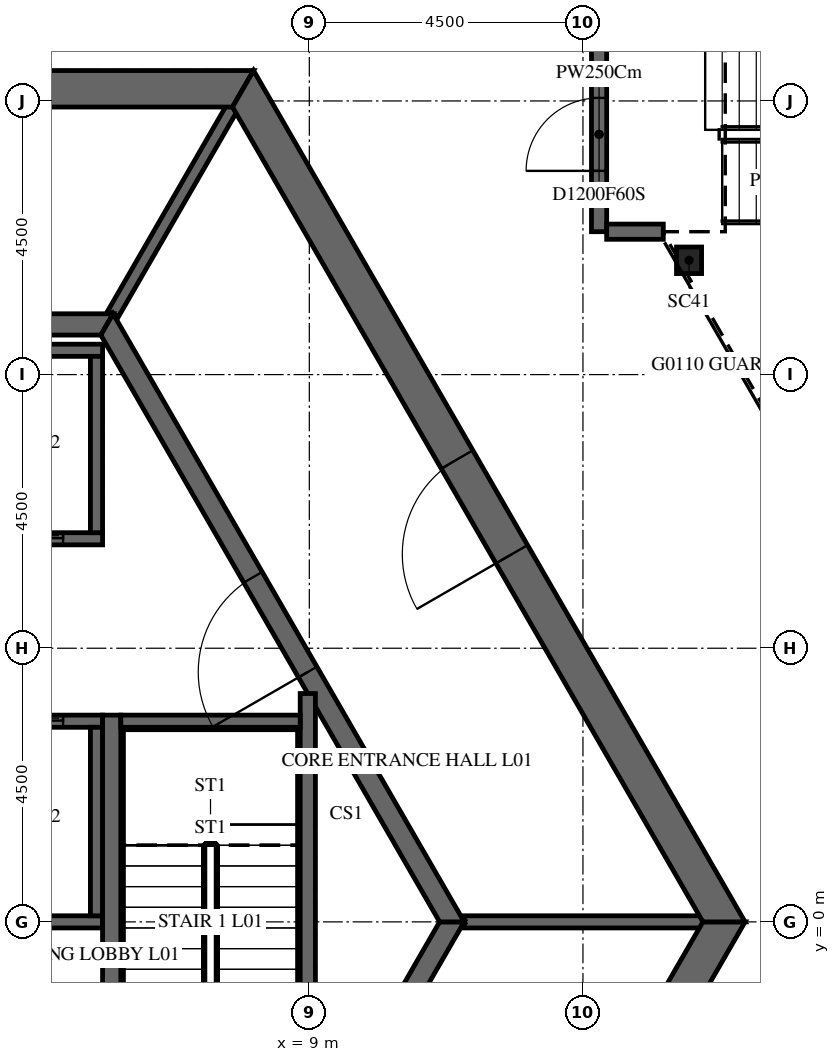
"""IFC4 building model, lengths in metres.
Left out: names, types, materials, properties, quantities, classifications, styles, units other than length and angle.
Written with IfcOpenShell. Run it as: python <this file> out.ifc"""

import sys

from ifc_helpers import new_model, si_unit, direction, frame, frame_2d, origin, origin_2d, place, context, subcontext, project, spatial, polyline, rectangle, i_section, outline, extrude, element, fill, save


model = new_model("IFC4")
c1 = context("Model", 3, precision=1e-05, world=origin(), true_north=direction((0.0, 1.0)))
c2 = subcontext(c1, "Body", "Model", "MODEL_VIEW")
j1 = project(units=[si_unit("LENGTHUNIT", "METRE"), si_unit("PLANEANGLEUNIT", "RADIAN")], contexts=[c1])
p1 = place(None, origin())
s1 = spatial("IfcSite", under=j1, at=p1, CompositionType="ELEMENT")
p2 = place(p1, origin())
s2 = spatial("IfcBuilding", under=s1, at=p2, CompositionType="ELEMENT")
p3 = place(p2, frame((0.0, 0.0, 9.0)))
s3 = spatial("IfcBuildingStorey", under=s2, at=p3, CompositionType="ELEMENT", Elevation=9.0)
p4 = place(p3, frame((15.245, 10.88, -0.25), z_axis=(0.0, 0.0, 1.0), x_axis=(1.0, 0.0, 0.0)))
e1 = element("IfcColumn", 1, at=p4, inside=s3, PredefinedType="COLUMN", context=c2, shape_type="SweptSolid", body=[
    extrude(i_section(OverallWidth=0.412, OverallDepth=0.437, WebThickness=0.036, FlangeThickness=0.058, FilletRadius=0.015, at=origin_2d()), origin(), (0.0, 0.0, 1.0), 6.0),
])
p5 = place(p3, frame((7.91, -13.7, -0.25), z_axis=(0.0, 0.0, 1.0), x_axis=(0.499999880136, 0.866025472988, 0.0)))
e2 = element("IfcWall", 2, at=p5, inside=s3, PredefinedType="SHEAR", context=c2, shape_type="SweptSolid", body=[
    extrude(outline(polyline([(-0.173, -0.3), (15.993, -0.3), (15.646, 0.3), (0.173, 0.3), (-0.173, -0.3)])), origin(), (0.0, 0.0, 1.0), 6.0),
])
p6 = place(p5, frame((7.039, 0.0, 0.25)))
e3 = element("IfcOpeningElement", 3, at=p6, cuts=e2, PredefinedType="OPENING", context=c2, shape_type="SweptSolid", body=[
    extrude(rectangle(XDim=1.8, YDim=2.4, at=frame_2d((0.9, 1.2))), frame((0.0, 0.31, 0.0), z_axis=(0.0, -1.0, 0.0), x_axis=(1.0, 0.0, 0.0)), (0.0, 0.0, 1.0), 0.62),
])
p7 = place(p3, frame((15.819, 0.0, -0.25), z_axis=(0.0, 0.0, 1.0), x_axis=(-0.499999880136, 0.866025472988, 0.0)))
e4 = element("IfcWall", 4, at=p7, inside=s3, PredefinedType="SHEAR", context=c2, shape_type="SweptSolid", body=[
    extrude(outline(polyline([(-0.173, -0.3), (15.993, -0.3), (15.646, 0.3), (0.173, 0.3), (-0.173, -0.3)])), origin(), (0.0, 0.0, 1.0), 6.0),
])
p8 = place(p7, frame((6.981, 0.0, 0.25)))
e5 = element("IfcOpeningElement", 5, at=p8, cuts=e4, PredefinedType="OPENING", context=c2, shape_type="SweptSolid", body=[
    extrude(rectangle(XDim=1.8, YDim=2.4, at=frame_2d((0.9, 1.2))), frame((0.0, 0.31, 0.0), z_axis=(0.0, -1.0, 0.0), x_axis=(1.0, 0.0, 0.0)), (0.0, 0.0, 1.0), 0.62),
])
p9 = place(p3, frame((7.91, 13.7, -0.25), z_axis=(0.0, 0.0, 1.0), x_axis=(-1.0, 0.0, 0.0)))
e6 = element("IfcWall", 6, at=p9, inside=s3, PredefinedType="SHEAR", context=c2, shape_type="SweptSolid", body=[
    extrude(outline(polyline([(-0.173, -0.3), (15.993, -0.3), (15.646, 0.3), (0.173, 0.3), (-0.173, -0.3)])), origin(), (0.0, 0.0, 1.0), 6.0),
])
p10 = place(p9, frame((7.31, 0.0, 0.25)))
e7 = element("IfcOpeningElement", 7, at=p10, cuts=e6, PredefinedType="OPENING", context=c2, shape_type="SweptSolid", body=[
    extrude(rectangle(XDim=1.2, YDim=2.4, at=frame_2d((0.6, 1.2))), frame((0.0, 0.31, 0.0), z_axis=(0.0, -1.0, 0.0), x_axis=(1.0, 0.0, 0.0)), (0.0, 0.0, 1.0), 0.62),
])
p11 = place(p3, frame((5.673, -9.825, -0.25), z_axis=(0.0, 0.0, 1.0), x_axis=(0.499995046907, 0.866028263435, 0.0)))
e8 = element("IfcWall", 8, at=p11, inside=s3, PredefinedType="SHEAR", context=c2, shape_type="SweptSolid", body=[
    extrude(outline(polyline([(-0.101, -0.175), (11.446, -0.175), (11.244, 0.175), (0.101, 0.175), (-0.101, -0.175)])), origin(), (0.0, 0.0, 1.0), 6.0),
])
p12 = place(p11, frame((4.801, 0.0, 0.25)))
e9 = element("IfcOpeningElement", 9, at=p12, cuts=e8, PredefinedType="OPENING", context=c2, shape_type="SweptSolid", body=[
    extrude(rectangle(XDim=1.8, YDim=2.4, at=frame_2d((0.9, 1.2))), frame((0.0, 0.185, 0.0), z_axis=(0.0, -1.0, 0.0), x_axis=(1.0, 0.0, 0.0)), (0.0, 0.0, 1.0), 0.37),
])
p13 = place(p3, frame((11.345, 0.0, -0.25), z_axis=(0.0, 0.0, 1.0), x_axis=(-0.499995046907, 0.866028263435, 0.0)))
e10 = element("IfcWall", 10, at=p13, inside=s3, PredefinedType="SHEAR", context=c2, shape_type="SweptSolid", body=[
    extrude(outline(polyline([(-0.101, -0.175), (11.446, -0.175), (11.244, 0.175), (0.101, 0.175), (-0.101, -0.175)])), origin(), (0.0, 0.0, 1.0), 6.0),
])
p14 = place(p13, frame((4.744, 0.0, 0.25)))
e11 = element("IfcOpeningElement", 11, at=p14, cuts=e10, PredefinedType="OPENING", context=c2, shape_type="SweptSolid", body=[
    extrude(rectangle(XDim=1.8, YDim=2.4, at=frame_2d((0.9, 1.2))), frame((0.0, 0.185, 0.0), z_axis=(0.0, -1.0, 0.0), x_axis=(1.0, 0.0, 0.0)), (0.0, 0.0, 1.0), 0.37),
])
p15 = place(p3, frame((5.673, 9.825, -0.25), z_axis=(0.0, 0.0, 1.0), x_axis=(-1.0, 0.0, 0.0)))
e12 = element("IfcWall", 12, at=p15, inside=s3, PredefinedType="SHEAR", context=c2, shape_type="SweptSolid", body=[
    extrude(outline(polyline([(-0.101, -0.175), (11.446, -0.175), (11.244, 0.175), (0.101, 0.175), (-0.101, -0.175)])), origin(), (0.0, 0.0, 1.0), 6.0),
])
p16 = place(p3, frame((-5.6, 6.3, -0.25), z_axis=(0.0, 0.0, 1.0), x_axis=(1.0, 0.0, 0.0)))
e13 = element("IfcWall", 13, at=p16, inside=s3, PredefinedType="SHEAR", context=c2, shape_type="SweptSolid", body=[
    extrude(rectangle(XDim=11.2, YDim=0.2, at=frame_2d((5.6, 0.0))), origin(), (0.0, 0.0, 1.0), 6.0),
])
p17 = place(p16, frame((0.65, 0.0, 0.25)))
e14 = element("IfcOpeningElement", 14, at=p17, cuts=e13, PredefinedType="OPENING", context=c2, shape_type="SweptSolid", body=[
    extrude(rectangle(XDim=1.1, YDim=2.1, at=frame_2d((0.55, 1.05))), frame((0.0, 0.11, 0.0), z_axis=(0.0, -1.0, 0.0), x_axis=(1.0, 0.0, 0.0)), (0.0, 0.0, 1.0), 0.22),
])
p18 = place(p16, frame((2.85, 0.0, 0.25)))
e15 = element("IfcOpeningElement", 15, at=p18, cuts=e13, PredefinedType="OPENING", context=c2, shape_type="SweptSolid", body=[
    extrude(rectangle(XDim=1.1, YDim=2.1, at=frame_2d((0.55, 1.05))), frame((0.0, 0.11, 0.0), z_axis=(0.0, -1.0, 0.0), x_axis=(1.0, 0.0, 0.0)), (0.0, 0.0, 1.0), 0.22),
])
p19 = place(p16, frame((5.05, 0.0, 0.25)))
e16 = element("IfcOpeningElement", 16, at=p19, cuts=e13, PredefinedType="OPENING", context=c2, shape_type="SweptSolid", body=[
    extrude(rectangle(XDim=1.1, YDim=2.1, at=frame_2d((0.55, 1.05))), frame((0.0, 0.11, 0.0), z_axis=(0.0, -1.0, 0.0), x_axis=(1.0, 0.0, 0.0)), (0.0, 0.0, 1.0), 0.22),
])
p20 = place(p16, frame((7.25, 0.0, 0.25)))
e17 = element("IfcOpeningElement", 17, at=p20, cuts=e13, PredefinedType="OPENING", context=c2, shape_type="SweptSolid", body=[
    extrude(rectangle(XDim=1.1, YDim=2.1, at=frame_2d((0.55, 1.05))), frame((0.0, 0.11, 0.0), z_axis=(0.0, -1.0, 0.0), x_axis=(1.0, 0.0, 0.0)), (0.0, 0.0, 1.0), 0.22),
])
p21 = place(p16, frame((9.45, 0.0, 0.25)))
e18 = element("IfcOpeningElement", 18, at=p21, cuts=e13, PredefinedType="OPENING", context=c2, shape_type="SweptSolid", body=[
    extrude(rectangle(XDim=1.1, YDim=2.1, at=frame_2d((0.55, 1.05))), frame((0.0, 0.11, 0.0), z_axis=(0.0, -1.0, 0.0), x_axis=(1.0, 0.0, 0.0)), (0.0, 0.0, 1.0), 0.22),
])
p22 = place(p3, frame((-5.6, 9.4, -0.25), z_axis=(0.0, 0.0, 1.0), x_axis=(1.0, 0.0, 0.0)))
e19 = element("IfcWall", 19, at=p22, inside=s3, PredefinedType="SHEAR", context=c2, shape_type="SweptSolid", body=[
    extrude(rectangle(XDim=11.2, YDim=0.2, at=frame_2d((5.6, 0.0))), origin(), (0.0, 0.0, 1.0), 6.0),
])
p23 = place(p3, frame((5.5, 6.4, -0.25), z_axis=(0.0, 0.0, 1.0), x_axis=(0.0, 1.0, 0.0)))
e20 = element("IfcWall", 20, at=p23, inside=s3, PredefinedType="SHEAR", context=c2, shape_type="SweptSolid", body=[
    extrude(rectangle(XDim=2.9, YDim=0.2, at=frame_2d((1.45, 0.0))), origin(), (0.0, 0.0, 1.0), 6.0),
])
p24 = place(p3, frame((-5.6, 3.3, -0.25), z_axis=(0.0, 0.0, 1.0), x_axis=(1.0, 0.0, 0.0)))
e21 = element("IfcWall", 21, at=p24, inside=s3, PredefinedType="SHEAR", context=c2, shape_type="SweptSolid", body=[
    extrude(rectangle(XDim=11.2, YDim=0.2, at=frame_2d((5.6, 0.0))), origin(), (0.0, 0.0, 1.0), 6.0),
])
p25 = place(p24, frame((0.65, 0.0, 0.25)))
e22 = element("IfcOpeningElement", 22, at=p25, cuts=e21, PredefinedType="OPENING", context=c2, shape_type="SweptSolid", body=[
    extrude(rectangle(XDim=1.1, YDim=2.1, at=frame_2d((0.55, 1.05))), frame((0.0, 0.11, 0.0), z_axis=(0.0, -1.0, 0.0), x_axis=(1.0, 0.0, 0.0)), (0.0, 0.0, 1.0), 0.22),
])
p26 = place(p24, frame((2.85, 0.0, 0.25)))
e23 = element("IfcOpeningElement", 23, at=p26, cuts=e21, PredefinedType="OPENING", context=c2, shape_type="SweptSolid", body=[
    extrude(rectangle(XDim=1.1, YDim=2.1, at=frame_2d((0.55, 1.05))), frame((0.0, 0.11, 0.0), z_axis=(0.0, -1.0, 0.0), x_axis=(1.0, 0.0, 0.0)), (0.0, 0.0, 1.0), 0.22),
])
p27 = place(p24, frame((5.05, 0.0, 0.25)))
e24 = element("IfcOpeningElement", 24, at=p27, cuts=e21, PredefinedType="OPENING", context=c2, shape_type="SweptSolid", body=[
    extrude(rectangle(XDim=1.1, YDim=2.1, at=frame_2d((0.55, 1.05))), frame((0.0, 0.11, 0.0), z_axis=(0.0, -1.0, 0.0), x_axis=(1.0, 0.0, 0.0)), (0.0, 0.0, 1.0), 0.22),
])
p28 = place(p24, frame((7.25, 0.0, 0.25)))
e25 = element("IfcOpeningElement", 25, at=p28, cuts=e21, PredefinedType="OPENING", context=c2, shape_type="SweptSolid", body=[
    extrude(rectangle(XDim=1.1, YDim=2.1, at=frame_2d((0.55, 1.05))), frame((0.0, 0.11, 0.0), z_axis=(0.0, -1.0, 0.0), x_axis=(1.0, 0.0, 0.0)), (0.0, 0.0, 1.0), 0.22),
])
p29 = place(p24, frame((9.45, 0.0, 0.25)))
e26 = element("IfcOpeningElement", 26, at=p29, cuts=e21, PredefinedType="OPENING", context=c2, shape_type="SweptSolid", body=[
    extrude(rectangle(XDim=1.1, YDim=2.1, at=frame_2d((0.55, 1.05))), frame((0.0, 0.11, 0.0), z_axis=(0.0, -1.0, 0.0), x_axis=(1.0, 0.0, 0.0)), (0.0, 0.0, 1.0), 0.22),
])
p30 = place(p3, frame((-5.6, 0.0, -0.25), z_axis=(0.0, 0.0, 1.0), x_axis=(1.0, 0.0, 0.0)))
e27 = element("IfcWall", 27, at=p30, inside=s3, PredefinedType="SHEAR", context=c2, shape_type="SweptSolid", body=[
    extrude(rectangle(XDim=11.2, YDim=0.2, at=frame_2d((5.6, 0.0))), origin(), (0.0, 0.0, 1.0), 6.0),
])
p31 = place(p3, frame((5.5, 0.1, -0.25), z_axis=(0.0, 0.0, 1.0), x_axis=(0.0, 1.0, 0.0)))
e28 = element("IfcWall", 28, at=p31, inside=s3, PredefinedType="SHEAR", context=c2, shape_type="SweptSolid", body=[
    extrude(rectangle(XDim=3.1, YDim=0.2, at=frame_2d((1.55, 0.0))), origin(), (0.0, 0.0, 1.0), 6.0),
])
p32 = place(p3, frame((11.547, 0.0, -0.25), z_axis=(0.0, 0.0, 1.0), x_axis=(1.0, 0.0, 0.0)))
e29 = element("IfcWall", 29, at=p32, inside=s3, PredefinedType="SHEAR", context=c2, shape_type="SweptSolid", body=[
    extrude(rectangle(XDim=3.926, YDim=0.2, at=frame_2d((1.963, 0.0))), origin(), (0.0, 0.0, 1.0), 6.0),
])
p33 = place(p3, frame((5.773, 10.0, -0.25), z_axis=(0.0, 0.0, 1.0), x_axis=(0.500038251005, 0.86600331843, 0.0)))
e30 = element("IfcWall", 30, at=p33, inside=s3, PredefinedType="SHEAR", context=c2, shape_type="SweptSolid", body=[
    extrude(rectangle(XDim=3.926, YDim=0.2, at=frame_2d((1.963, 0.0))), origin(), (0.0, 0.0, 1.0), 6.0),
])
p34 = place(p3, frame((5.75, -3.4, -0.25), z_axis=(0.0, 0.0, 1.0), x_axis=(0.0, 1.0, 0.0)))
e31 = element("IfcWall", 31, at=p34, inside=s3, PredefinedType="SHEAR", context=c2, shape_type="SweptSolid", body=[
    extrude(rectangle(XDim=6.8, YDim=0.3, at=frame_2d((3.4, 0.0))), origin(), (0.0, 0.0, 1.0), 6.0),
])
p35 = place(p3, frame((8.975, -3.755, -0.25), z_axis=(0.0, 0.0, 1.0), x_axis=(0.0, 1.0, 0.0)))
e32 = element("IfcWall", 32, at=p35, inside=s3, PredefinedType="SHEAR", context=c2, shape_type="SweptSolid", body=[
    extrude(rectangle(XDim=7.51, YDim=0.25, at=frame_2d((3.755, 0.0))), origin(), (0.0, 0.0, 1.0), 6.0),
])
p36 = place(p3, frame((5.9, 3.3, -0.25), z_axis=(0.0, 0.0, 1.0), x_axis=(1.0, 0.0, 0.0)))
e33 = element("IfcWall", 33, at=p36, inside=s3, PredefinedType="SHEAR", context=c2, shape_type="SweptSolid", body=[
    extrude(rectangle(XDim=2.95, YDim=0.2, at=frame_2d((1.475, 0.0))), origin(), (0.0, 0.0, 1.0), 6.0),
])
p37 = place(p3, frame((13.765, 11.35, 0.0), z_axis=(0.0, 0.0, 1.0), x_axis=(0.0, 1.0, 0.0)))
e34 = element("IfcWall", 34, at=p37, inside=s3, PredefinedType="PARTITIONING", context=c2, shape_type="SweptSolid", body=[
    extrude(rectangle(XDim=3.2, YDim=0.25, at=frame_2d((1.6, 0.0))), origin(), (0.0, 0.0, 1.0), 4.996),
])
p38 = place(p37, frame((1.0, 0.0, 0.0)))
e35 = element("IfcOpeningElement", 35, at=p38, cuts=e34, PredefinedType="OPENING", context=c2, shape_type="SweptSolid", body=[
    extrude(rectangle(XDim=1.2, YDim=2.1, at=frame_2d((0.6, 1.05))), frame((0.0, 0.135, 0.0), z_axis=(0.0, -1.0, 0.0), x_axis=(1.0, 0.0, 0.0)), (0.0, 0.0, 1.0), 0.27),
])
p39 = place(p3, frame((14.821, 11.35, 0.0), z_axis=(0.0, 0.0, 1.0), x_axis=(-1.0, 0.0, 0.0)))
e36 = element("IfcWall", 36, at=p39, inside=s3, PredefinedType="PARTITIONING", context=c2, shape_type="SweptSolid", body=[
    extrude(rectangle(XDim=0.931, YDim=0.25, at=frame_2d((0.466, 0.0))), origin(), (0.0, 0.0, 1.0), 5.75),
])
p40 = place(p8, origin())
e37 = element("IfcDoor", 37, at=p40, inside=s3, OperationType="DOUBLE_DOOR_SINGLE_SWING", PredefinedType="DOOR", context=c2, shape_type="SweptSolid", body=[
    extrude(rectangle(XDim=1.8, YDim=2.4, at=frame_2d((0.9, 1.2))), frame((0.0, 0.025, 0.0), z_axis=(0.0, -1.0, 0.0), x_axis=(1.0, 0.0, 0.0)), (0.0, 0.0, 1.0), 0.05),
])
fill(e5, e37)
p41 = place(p14, origin())
e38 = element("IfcDoor", 38, at=p41, inside=s3, OperationType="DOUBLE_DOOR_SINGLE_SWING", PredefinedType="DOOR", context=c2, shape_type="SweptSolid", body=[
    extrude(rectangle(XDim=1.8, YDim=2.4, at=frame_2d((0.9, 1.2))), frame((0.0, 0.025, 0.0), z_axis=(0.0, -1.0, 0.0), x_axis=(1.0, 0.0, 0.0)), (0.0, 0.0, 1.0), 0.05),
])
fill(e11, e38)
p42 = place(p21, origin())
e39 = element("IfcDoor", 39, at=p42, inside=s3, OperationType="SLIDING_TO_LEFT", PredefinedType="DOOR", context=c2, shape_type="SweptSolid", body=[
    extrude(rectangle(XDim=1.1, YDim=2.1, at=frame_2d((0.55, 1.05))), frame((0.0, 0.025, 0.0), z_axis=(0.0, -1.0, 0.0), x_axis=(1.0, 0.0, 0.0)), (0.0, 0.0, 1.0), 0.05),
])
fill(e18, e39)
p43 = place(p29, origin())
e40 = element("IfcDoor", 40, at=p43, inside=s3, OperationType="SLIDING_TO_LEFT", PredefinedType="DOOR", context=c2, shape_type="SweptSolid", body=[
    extrude(rectangle(XDim=1.1, YDim=2.1, at=frame_2d((0.55, 1.05))), frame((0.0, 0.025, 0.0), z_axis=(0.0, -1.0, 0.0), x_axis=(1.0, 0.0, 0.0)), (0.0, 0.0, 1.0), 0.05),
])
fill(e26, e40)
p44 = place(p38, origin())
e41 = element("IfcDoor", 41, at=p44, inside=s3, OperationType="SINGLE_SWING_LEFT", PredefinedType="DOOR", context=c2, shape_type="SweptSolid", body=[
    extrude(rectangle(XDim=1.2, YDim=2.1, at=frame_2d((0.6, 1.05))), frame((0.0, 0.025, 0.0), z_axis=(0.0, -1.0, 0.0), x_axis=(1.0, 0.0, 0.0)), (0.0, 0.0, 1.0), 0.05),
])
fill(e35, e41)
save(model, sys.argv[1])
